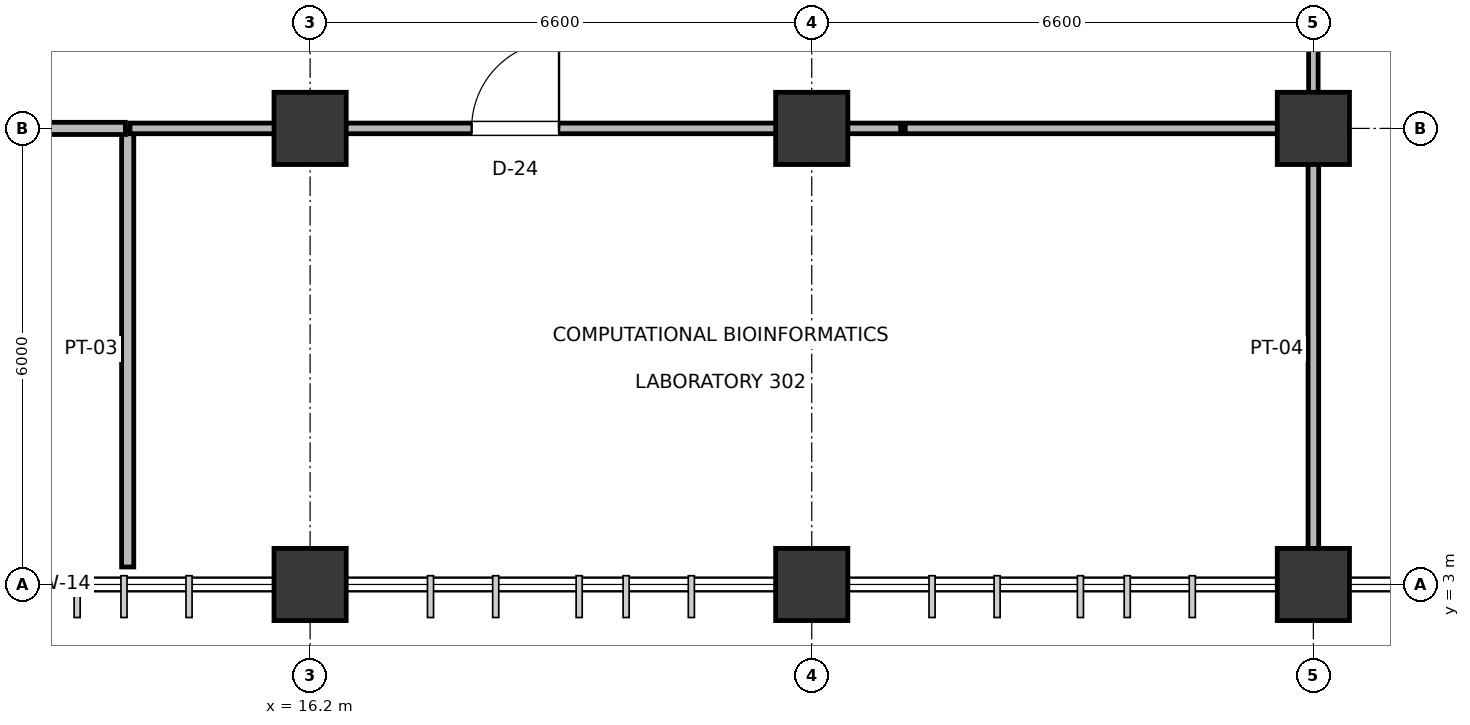
"""IFC4 building model, lengths in metres.
Left out: names, types, materials, properties, quantities, classifications, styles, units other than length and angle.
Written with IfcOpenShell. Run it as: python <this file> out.ifc"""

import sys

from ifc_helpers import new_model, si_unit, direction, frame, frame_2d, origin, origin_2d, place, context, subcontext, project, spatial, rectangle, extrude, element, fill, save


model = new_model("IFC4")
c1 = context("Model", 3, precision=1e-05, world=origin(), true_north=direction((0.0, 1.0)))
c2 = subcontext(c1, "Body", "Model", "MODEL_VIEW")
j1 = project(units=[si_unit("LENGTHUNIT", "METRE"), si_unit("PLANEANGLEUNIT", "RADIAN")], contexts=[c1])
p1 = place(None, origin())
s1 = spatial("IfcSite", under=j1, at=p1, CompositionType="ELEMENT")
p2 = place(p1, origin())
s2 = spatial("IfcBuilding", under=s1, at=p2, CompositionType="ELEMENT")
p3 = place(p2, frame((0.0, 0.0, 15.0)))
s3 = spatial("IfcBuildingStorey", under=s2, at=p3, CompositionType="ELEMENT", Elevation=15.0)
for number, where, z_axis, x_axis in (
    (1, (16.2, 3.0, 0.0), (0.0, 0.0, 1.0), (1.0, 0.0, 0.0)),
    (2, (16.2, 9.0, 0.0), (0.0, 0.0, 1.0), (1.0, 0.0, 0.0)),
    (3, (22.8, 3.0, 0.0), (0.0, 0.0, 1.0), (1.0, 0.0, 0.0)),
    (4, (22.8, 9.0, 0.0), (0.0, 0.0, 1.0), (1.0, 0.0, 0.0)),
    (5, (29.4, 3.0, 0.0), (0.0, 0.0, 1.0), (1.0, 0.0, 0.0)),
    (6, (29.4, 9.0, 0.0), (0.0, 0.0, 1.0), (1.0, 0.0, 0.0)),
):
    element("IfcColumn", number, at=place(p3, frame(where, z_axis=z_axis, x_axis=x_axis)), inside=s3, PredefinedType="COLUMN", context=c2, shape_type="SweptSolid", body=[
        extrude(rectangle(XDim=0.95, YDim=0.95, at=origin_2d()), origin(), (0.0, 0.0, 1.0), 4.5),
    ])
p4 = place(p3, frame((13.8, 3.23, 0.0), z_axis=(0.0, 0.0, 1.0), x_axis=(0.0, 1.0, 0.0)))
e7 = element("IfcWall", 7, at=p4, inside=s3, PredefinedType="PARTITIONING", context=c2, shape_type="SweptSolid", body=[
    extrude(rectangle(XDim=5.74, YDim=0.16, at=frame_2d((2.87, 0.0))), origin(), (0.0, 0.0, 1.0), 3.535),
])
p5 = place(p3, frame((10.83, 9.0, 0.0), z_axis=(0.0, 0.0, 1.0), x_axis=(1.0, 0.0, 0.0)))
e8 = element("IfcWall", 8, at=p5, inside=s3, PredefinedType="PARTITIONING", context=c2, shape_type="SweptSolid", body=[
    extrude(rectangle(XDim=2.94, YDim=0.16, at=frame_2d((1.47, 0.0))), origin(), (0.0, 0.0, 1.0), 3.535),
])
p6 = place(p3, frame((29.4, 3.23, 0.0), z_axis=(0.0, 0.0, 1.0), x_axis=(0.0, 1.0, 0.0)))
e9 = element("IfcWall", 9, at=p6, inside=s3, PredefinedType="PARTITIONING", context=c2, shape_type="SweptSolid", body=[
    extrude(rectangle(XDim=5.74, YDim=0.14, at=frame_2d((2.87, 0.0))), origin(), (0.0, 0.0, 1.0), 3.625),
])
p7 = place(p3, frame((24.03, 9.0, 0.0), z_axis=(0.0, 0.0, 1.0), x_axis=(1.0, 0.0, 0.0)))
e10 = element("IfcWall", 10, at=p7, inside=s3, PredefinedType="PARTITIONING", context=c2, shape_type="SweptSolid", body=[
    extrude(rectangle(XDim=5.34, YDim=0.14, at=frame_2d((2.67, 0.0))), origin(), (0.0, 0.0, 1.0), 3.495),
])
p8 = place(p3, frame((13.83, 9.0, 0.0), z_axis=(0.0, 0.0, 1.0), x_axis=(1.0, 0.0, 0.0)))
e11 = element("IfcWall", 11, at=p8, inside=s3, PredefinedType="PARTITIONING", context=c2, shape_type="SweptSolid", body=[
    extrude(rectangle(XDim=10.14, YDim=0.14, at=frame_2d((5.07, 0.0))), origin(), (0.0, 0.0, 1.0), 3.495),
])
p9 = place(p8, frame((4.495, 0.0, 0.0)))
e12 = element("IfcOpeningElement", 12, at=p9, cuts=e11, PredefinedType="OPENING", context=c2, shape_type="SweptSolid", body=[
    extrude(rectangle(XDim=1.15, YDim=2.15, at=frame_2d((0.575, 1.075))), frame((0.0, 0.08, 0.0), z_axis=(0.0, -1.0, 0.0), x_axis=(1.0, 0.0, 0.0)), (0.0, 0.0, 1.0), 0.16),
])
p10 = place(p3, frame((29.4, 9.03, 0.0), z_axis=(0.0, 0.0, 1.0), x_axis=(0.0, 1.0, 0.0)))
e13 = element("IfcWall", 13, at=p10, inside=s3, PredefinedType="PARTITIONING", context=c2, shape_type="SweptSolid", body=[
    extrude(rectangle(XDim=11.54, YDim=0.125, at=frame_2d((5.77, 0.0))), origin(), (0.0, 0.0, 1.0), 3.425),
])
p11 = place(p10, frame((5.23, 0.0, 0.0)))
e14 = element("IfcOpeningElement", 14, at=p11, cuts=e13, PredefinedType="OPENING", context=c2, shape_type="SweptSolid", body=[
    extrude(rectangle(XDim=1.08, YDim=2.15, at=frame_2d((0.54, 1.075))), frame((0.0, 0.073, 0.0), z_axis=(0.0, -1.0, 0.0), x_axis=(1.0, 0.0, 0.0)), (0.0, 0.0, 1.0), 0.145),
])
p12 = place(p9, origin())
e15 = element("IfcDoor", 15, at=p12, inside=s3, OperationType="SINGLE_SWING_RIGHT", PredefinedType="DOOR", context=c2, shape_type="SweptSolid", body=[
    extrude(rectangle(XDim=1.15, YDim=2.15, at=frame_2d((0.575, 1.075))), frame((0.0, 0.025, 0.0), z_axis=(0.0, -1.0, 0.0), x_axis=(1.0, 0.0, 0.0)), (0.0, 0.0, 1.0), 0.05),
])
fill(e12, e15)
save(model, sys.argv[1])
